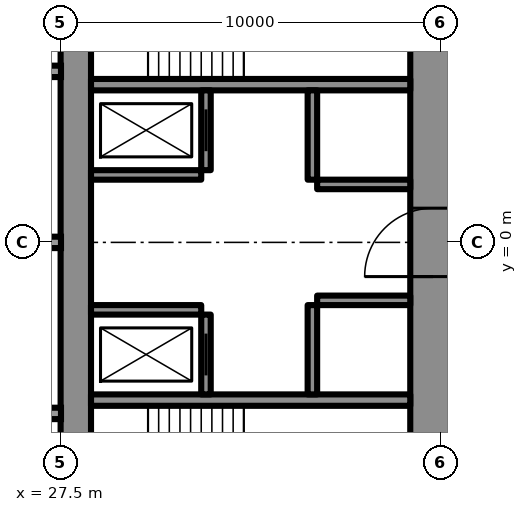
"""IFC4 building model, lengths in metres.
Left out: names, types, materials, properties, quantities, classifications, styles, units other than length and angle.
Written with IfcOpenShell. Run it as: python <this file> out.ifc"""

import sys

from ifc_helpers import new_model, si_unit, direction, frame, frame_2d, origin, place, context, subcontext, project, spatial, rectangle, extrude, element, fill, save


model = new_model("IFC4")
c1 = context("Model", 3, precision=1e-05, world=origin(), true_north=direction((0.0, 1.0)))
c2 = subcontext(c1, "Body", "Model", "MODEL_VIEW")
j1 = project(units=[si_unit("LENGTHUNIT", "METRE"), si_unit("PLANEANGLEUNIT", "RADIAN")], contexts=[c1])
p1 = place(None, origin())
s1 = spatial("IfcSite", under=j1, at=p1, CompositionType="ELEMENT")
p2 = place(p1, origin())
s2 = spatial("IfcBuilding", under=s1, at=p2, CompositionType="ELEMENT")
p3 = place(p2, frame((0.0, 0.0, 125.6)))
s3 = spatial("IfcBuildingStorey", under=s2, at=p3, CompositionType="ELEMENT", Elevation=125.6)
p4 = place(p3, frame((27.9, -8.6, 0.0), z_axis=(0.0, 0.0, 1.0), x_axis=(0.0, 1.0, 0.0)))
e1 = element("IfcWall", 1, at=p4, inside=s3, PredefinedType="SHEAR", context=c2, shape_type="SweptSolid", body=[
    extrude(rectangle(XDim=17.2, YDim=0.8, at=frame_2d((8.6, 0.0))), origin(), (0.0, 0.0, 1.0), 3.5),
])
p5 = place(p4, frame((2.45, 0.0, 0.6)))
e2 = element("IfcOpeningElement", 2, at=p5, cuts=e1, PredefinedType="OPENING", context=c2, shape_type="SweptSolid", body=[
    extrude(rectangle(XDim=0.6, YDim=2.1, at=frame_2d((0.3, 1.05))), frame((0.0, 0.41, 0.0), z_axis=(0.0, -1.0, 0.0), x_axis=(1.0, 0.0, 0.0)), (0.0, 0.0, 1.0), 0.82),
])
p6 = place(p4, frame((14.15, 0.0, 0.6)))
e3 = element("IfcOpeningElement", 3, at=p6, cuts=e1, PredefinedType="OPENING", context=c2, shape_type="SweptSolid", body=[
    extrude(rectangle(XDim=0.6, YDim=2.1, at=frame_2d((0.3, 1.05))), frame((0.0, 0.41, 0.0), z_axis=(0.0, -1.0, 0.0), x_axis=(1.0, 0.0, 0.0)), (0.0, 0.0, 1.0), 0.82),
])
p7 = place(p3, frame((37.3, -8.6, 0.0), z_axis=(0.0, 0.0, 1.0), x_axis=(0.0, 1.0, 0.0)))
e4 = element("IfcWall", 4, at=p7, inside=s3, PredefinedType="SHEAR", context=c2, shape_type="SweptSolid", body=[
    extrude(rectangle(XDim=17.2, YDim=1.2, at=frame_2d((8.6, 0.0))), origin(), (0.0, 0.0, 1.0), 3.5),
])
p8 = place(p7, frame((7.7, 0.0, 0.0)))
e5 = element("IfcOpeningElement", 5, at=p8, cuts=e4, PredefinedType="OPENING", context=c2, shape_type="SweptSolid", body=[
    extrude(rectangle(XDim=1.8, YDim=2.2, at=frame_2d((0.9, 1.1))), frame((0.0, 0.61, 0.0), z_axis=(0.0, -1.0, 0.0), x_axis=(1.0, 0.0, 0.0)), (0.0, 0.0, 1.0), 1.22),
])
for number, where, z_axis, x_axis in (
    (6, (28.3, -4.15, 0.0), (0.0, 0.0, 1.0), (1.0, 0.0, 0.0)),
    (7, (28.3, 4.15, 0.0), (0.0, 0.0, 1.0), (1.0, 0.0, 0.0)),
):
    element("IfcWall", number, at=place(p3, frame(where, z_axis=z_axis, x_axis=x_axis)), inside=s3, PredefinedType="SHEAR", context=c2, shape_type="SweptSolid", body=[
        extrude(rectangle(XDim=8.4, YDim=0.3, at=frame_2d((4.2, 0.0))), origin(), (0.0, 0.0, 1.0), 3.5),
    ])
p9 = place(p3, frame((31.325, -4.0, 0.0), z_axis=(0.0, 0.0, 1.0), x_axis=(0.0, 1.0, 0.0)))
e8 = element("IfcWall", 8, at=p9, inside=s3, PredefinedType="SHEAR", context=c2, shape_type="SweptSolid", body=[
    extrude(rectangle(XDim=2.1, YDim=0.25, at=frame_2d((1.05, 0.0))), origin(), (0.0, 0.0, 1.0), 3.5),
])
p10 = place(p9, frame((0.5, 0.0, 0.0)))
e9 = element("IfcOpeningElement", 9, at=p10, cuts=e8, PredefinedType="OPENING", context=c2, shape_type="SweptSolid", body=[
    extrude(rectangle(XDim=1.1, YDim=2.2, at=frame_2d((0.55, 1.1))), frame((0.0, 0.135, 0.0), z_axis=(0.0, -1.0, 0.0), x_axis=(1.0, 0.0, 0.0)), (0.0, 0.0, 1.0), 0.27),
])
p11 = place(p3, frame((34.125, -4.0, 0.0), z_axis=(0.0, 0.0, 1.0), x_axis=(0.0, 1.0, 0.0)))
e10 = element("IfcWall", 10, at=p11, inside=s3, PredefinedType="SHEAR", context=c2, shape_type="SweptSolid", body=[
    extrude(rectangle(XDim=2.35, YDim=0.25, at=frame_2d((1.175, 0.0))), origin(), (0.0, 0.0, 1.0), 3.5),
])
p12 = place(p3, frame((28.3, -1.775, 0.0), z_axis=(0.0, 0.0, 1.0), x_axis=(1.0, 0.0, 0.0)))
e11 = element("IfcWall", 11, at=p12, inside=s3, PredefinedType="SHEAR", context=c2, shape_type="SweptSolid", body=[
    extrude(rectangle(XDim=2.9, YDim=0.25, at=frame_2d((1.45, 0.0))), origin(), (0.0, 0.0, 1.0), 3.5),
])
p13 = place(p3, frame((34.25, -1.525, 0.0), z_axis=(0.0, 0.0, 1.0), x_axis=(1.0, 0.0, 0.0)))
e12 = element("IfcWall", 12, at=p13, inside=s3, PredefinedType="SHEAR", context=c2, shape_type="SweptSolid", body=[
    extrude(rectangle(XDim=2.45, YDim=0.25, at=frame_2d((1.225, 0.0))), origin(), (0.0, 0.0, 1.0), 3.5),
])
p14 = place(p3, frame((31.325, 1.9, 0.0), z_axis=(0.0, 0.0, 1.0), x_axis=(0.0, 1.0, 0.0)))
e13 = element("IfcWall", 13, at=p14, inside=s3, PredefinedType="SHEAR", context=c2, shape_type="SweptSolid", body=[
    extrude(rectangle(XDim=2.1, YDim=0.25, at=frame_2d((1.05, 0.0))), origin(), (0.0, 0.0, 1.0), 3.5),
])
p15 = place(p14, frame((0.5, 0.0, 0.0)))
e14 = element("IfcOpeningElement", 14, at=p15, cuts=e13, PredefinedType="OPENING", context=c2, shape_type="SweptSolid", body=[
    extrude(rectangle(XDim=1.1, YDim=2.2, at=frame_2d((0.55, 1.1))), frame((0.0, 0.135, 0.0), z_axis=(0.0, -1.0, 0.0), x_axis=(1.0, 0.0, 0.0)), (0.0, 0.0, 1.0), 0.27),
])
p16 = place(p3, frame((34.125, 1.65, 0.0), z_axis=(0.0, 0.0, 1.0), x_axis=(0.0, 1.0, 0.0)))
e15 = element("IfcWall", 15, at=p16, inside=s3, PredefinedType="SHEAR", context=c2, shape_type="SweptSolid", body=[
    extrude(rectangle(XDim=2.35, YDim=0.25, at=frame_2d((1.175, 0.0))), origin(), (0.0, 0.0, 1.0), 3.5),
])
p17 = place(p3, frame((28.3, 1.775, 0.0), z_axis=(0.0, 0.0, 1.0), x_axis=(1.0, 0.0, 0.0)))
e16 = element("IfcWall", 16, at=p17, inside=s3, PredefinedType="SHEAR", context=c2, shape_type="SweptSolid", body=[
    extrude(rectangle(XDim=2.9, YDim=0.25, at=frame_2d((1.45, 0.0))), origin(), (0.0, 0.0, 1.0), 3.5),
])
p18 = place(p3, frame((34.25, 1.525, 0.0), z_axis=(0.0, 0.0, 1.0), x_axis=(1.0, 0.0, 0.0)))
e17 = element("IfcWall", 17, at=p18, inside=s3, PredefinedType="SHEAR", context=c2, shape_type="SweptSolid", body=[
    extrude(rectangle(XDim=2.45, YDim=0.25, at=frame_2d((1.225, 0.0))), origin(), (0.0, 0.0, 1.0), 3.5),
])
p19 = place(p3, frame((27.2, -13.8, 0.0), z_axis=(0.0, 0.0, 1.0), x_axis=(0.866027159892, 0.499996958321, 0.0)))
e18 = element("IfcWall", 18, at=p19, inside=s3, PredefinedType="SHEAR", context=c2, shape_type="SweptSolid", body=[
    extrude(rectangle(XDim=27.947, YDim=1.2, at=frame_2d((13.973, 0.0))), origin(), (0.0, 0.0, 1.0), 3.5),
])
p20 = place(p19, frame((4.6, 0.0, 0.0)))
e19 = element("IfcOpeningElement", 19, at=p20, cuts=e18, PredefinedType="OPENING", context=c2, shape_type="SweptSolid", body=[
    extrude(rectangle(XDim=1.0, YDim=2.2, at=frame_2d((0.5, 1.1))), frame((0.0, 0.61, 0.0), z_axis=(0.0, -1.0, 0.0), x_axis=(1.0, 0.0, 0.0)), (0.0, 0.0, 1.0), 1.22),
])
p21 = place(p19, frame((13.395, 0.0, 0.0)))
e20 = element("IfcOpeningElement", 20, at=p21, cuts=e18, PredefinedType="OPENING", context=c2, shape_type="SweptSolid", body=[
    extrude(rectangle(XDim=1.8, YDim=2.2, at=frame_2d((0.9, 1.1))), frame((0.0, 0.61, 0.0), z_axis=(0.0, -1.0, 0.0), x_axis=(1.0, 0.0, 0.0)), (0.0, 0.0, 1.0), 1.22),
])
p22 = place(p3, frame((27.2, 13.8, 0.0), z_axis=(0.0, 0.0, 1.0), x_axis=(0.866024515034, -0.500001539357, 0.0)))
e21 = element("IfcWall", 21, at=p22, inside=s3, PredefinedType="SHEAR", context=c2, shape_type="SweptSolid", body=[
    extrude(rectangle(XDim=26.907, YDim=1.2, at=frame_2d((13.454, 0.0))), origin(), (0.0, 0.0, 1.0), 3.5),
])
p23 = place(p22, frame((4.6, 0.0, 0.0)))
e22 = element("IfcOpeningElement", 22, at=p23, cuts=e21, PredefinedType="OPENING", context=c2, shape_type="SweptSolid", body=[
    extrude(rectangle(XDim=1.0, YDim=2.2, at=frame_2d((0.5, 1.1))), frame((0.0, 0.61, 0.0), z_axis=(0.0, -1.0, 0.0), x_axis=(1.0, 0.0, 0.0)), (0.0, 0.0, 1.0), 1.22),
])
p24 = place(p22, frame((13.395, 0.0, 0.0)))
e23 = element("IfcOpeningElement", 23, at=p24, cuts=e21, PredefinedType="OPENING", context=c2, shape_type="SweptSolid", body=[
    extrude(rectangle(XDim=1.8, YDim=2.2, at=frame_2d((0.9, 1.1))), frame((0.0, 0.61, 0.0), z_axis=(0.0, -1.0, 0.0), x_axis=(1.0, 0.0, 0.0)), (0.0, 0.0, 1.0), 1.22),
])
p25 = place(p3, frame((36.834, 10.894, 0.0), z_axis=(0.0, 0.0, 1.0), x_axis=(0.866028157229, -0.499995230863, 0.0)))
e24 = element("IfcWall", 24, at=p25, inside=s3, PredefinedType="PARTITIONING", context=c2, shape_type="SweptSolid", body=[
    extrude(rectangle(XDim=21.667, YDim=0.2, at=frame_2d((10.833, 0.0))), origin(), (0.0, 0.0, 1.0), 3.25),
])
p26 = place(p25, frame((20.117, 0.0, 0.0)))
e25 = element("IfcOpeningElement", 25, at=p26, cuts=e24, PredefinedType="OPENING", context=c2, shape_type="SweptSolid", body=[
    extrude(rectangle(XDim=0.95, YDim=2.2, at=frame_2d((0.475, 1.1))), frame((0.0, 0.11, 0.0), z_axis=(0.0, -1.0, 0.0), x_axis=(1.0, 0.0, 0.0)), (0.0, 0.0, 1.0), 0.22),
])
p27 = place(p25, frame((14.04, 0.0, 0.0)))
e26 = element("IfcOpeningElement", 26, at=p27, cuts=e24, PredefinedType="OPENING", context=c2, shape_type="SweptSolid", body=[
    extrude(rectangle(XDim=0.95, YDim=2.2, at=frame_2d((0.475, 1.1))), frame((0.0, 0.11, 0.0), z_axis=(0.0, -1.0, 0.0), x_axis=(1.0, 0.0, 0.0)), (0.0, 0.0, 1.0), 0.22),
])
p28 = place(p25, frame((7.697, 0.0, 0.0)))
e27 = element("IfcOpeningElement", 27, at=p28, cuts=e24, PredefinedType="OPENING", context=c2, shape_type="SweptSolid", body=[
    extrude(rectangle(XDim=0.95, YDim=2.2, at=frame_2d((0.475, 1.1))), frame((0.0, 0.11, 0.0), z_axis=(0.0, -1.0, 0.0), x_axis=(1.0, 0.0, 0.0)), (0.0, 0.0, 1.0), 0.22),
])
p29 = place(p25, frame((3.35, 0.0, 0.0)))
e28 = element("IfcOpeningElement", 28, at=p29, cuts=e24, PredefinedType="OPENING", context=c2, shape_type="SweptSolid", body=[
    extrude(rectangle(XDim=1.0, YDim=2.2, at=frame_2d((0.5, 1.1))), frame((0.0, 0.11, 0.0), z_axis=(0.0, -1.0, 0.0), x_axis=(1.0, 0.0, 0.0)), (0.0, 0.0, 1.0), 0.22),
])
p30 = place(p8, origin())
e29 = element("IfcDoor", 29, at=p30, inside=s3, OperationType="DOUBLE_DOOR_SINGLE_SWING", PredefinedType="DOOR", context=c2, shape_type="SweptSolid", body=[
    extrude(rectangle(XDim=1.8, YDim=2.2, at=frame_2d((0.9, 1.1))), frame((0.0, 0.025, 0.0), z_axis=(0.0, -1.0, 0.0), x_axis=(1.0, 0.0, 0.0)), (0.0, 0.0, 1.0), 0.05),
])
fill(e5, e29)
p31 = place(p10, origin())
e30 = element("IfcDoor", 30, at=p31, inside=s3, OperationType="SLIDING_TO_LEFT", PredefinedType="USERDEFINED", context=c2, shape_type="SweptSolid", body=[
    extrude(rectangle(XDim=1.1, YDim=2.2, at=frame_2d((0.55, 1.1))), frame((0.0, 0.025, 0.0), z_axis=(0.0, -1.0, 0.0), x_axis=(1.0, 0.0, 0.0)), (0.0, 0.0, 1.0), 0.05),
])
fill(e9, e30)
p32 = place(p15, origin())
e31 = element("IfcDoor", 31, at=p32, inside=s3, OperationType="SLIDING_TO_LEFT", PredefinedType="USERDEFINED", context=c2, shape_type="SweptSolid", body=[
    extrude(rectangle(XDim=1.1, YDim=2.2, at=frame_2d((0.55, 1.1))), frame((0.0, 0.025, 0.0), z_axis=(0.0, -1.0, 0.0), x_axis=(1.0, 0.0, 0.0)), (0.0, 0.0, 1.0), 0.05),
])
fill(e14, e31)
save(model, sys.argv[1])
